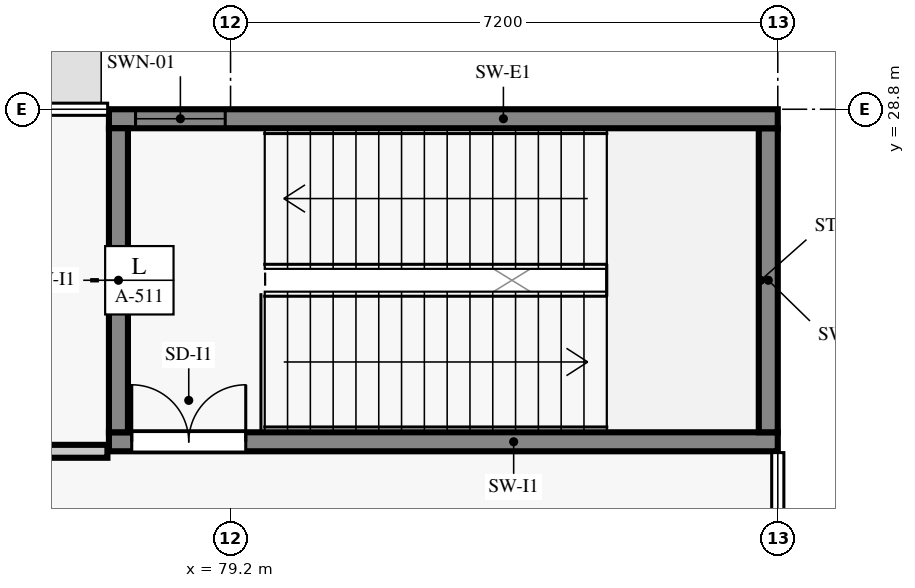
"""IFC4 building model, lengths in metres.
Left out: names, types, materials, properties, quantities, classifications, styles, units other than length and angle.
Written with IfcOpenShell. Run it as: python <this file> out.ifc"""

import sys

from ifc_helpers import new_model, si_unit, direction, frame, frame_2d, origin, place, context, subcontext, project, spatial, rectangle, extrude, element, fill, save


model = new_model("IFC4")
c1 = context("Model", 3, precision=1e-05, world=origin(), true_north=direction((0.0, 1.0)))
c2 = subcontext(c1, "Body", "Model", "MODEL_VIEW")
j1 = project(units=[si_unit("LENGTHUNIT", "METRE"), si_unit("PLANEANGLEUNIT", "RADIAN")], contexts=[c1])
p1 = place(None, origin())
s1 = spatial("IfcSite", under=j1, at=p1, CompositionType="ELEMENT")
p2 = place(p1, origin())
s2 = spatial("IfcBuilding", under=s1, at=p2, CompositionType="ELEMENT")
p3 = place(p2, frame((0.0, 0.0, 4.8)))
s3 = spatial("IfcBuildingStorey", under=s2, at=p3, CompositionType="ELEMENT", Elevation=4.8)
p4 = place(p3, frame((77.6, 24.425, 0.0), z_axis=(0.0, 0.0, 1.0), x_axis=(1.0, 0.0, 0.0)))
e1 = element("IfcWall", 1, at=p4, inside=s3, PredefinedType="SHEAR", context=c2, shape_type="SweptSolid", body=[
    extrude(rectangle(XDim=8.8, YDim=0.25, at=frame_2d((4.4, 0.0))), origin(), (0.0, 0.0, 1.0), 4.505),
])
p5 = place(p4, frame((0.3, 0.0, 0.0)))
e2 = element("IfcOpeningElement", 2, at=p5, cuts=e1, PredefinedType="OPENING", context=c2, shape_type="SweptSolid", body=[
    extrude(rectangle(XDim=1.5, YDim=2.15, at=frame_2d((0.75, 1.075))), frame((0.0, 0.135, 0.0), z_axis=(0.0, -1.0, 0.0), x_axis=(1.0, 0.0, 0.0)), (0.0, 0.0, 1.0), 0.27),
])
p6 = place(p3, frame((86.275, 24.55, 0.0), z_axis=(0.0, 0.0, 1.0), x_axis=(0.0, 1.0, 0.0)))
e3 = element("IfcWall", 3, at=p6, inside=s3, PredefinedType="SHEAR", context=c2, shape_type="SweptSolid", body=[
    extrude(rectangle(XDim=4.0, YDim=0.25, at=frame_2d((2.0, 0.0))), origin(), (0.0, 0.0, 1.0), 4.505),
])
p7 = place(p3, frame((86.4, 28.675, 0.0), z_axis=(0.0, 0.0, 1.0), x_axis=(-1.0, 0.0, 0.0)))
e4 = element("IfcWall", 4, at=p7, inside=s3, PredefinedType="SHEAR", context=c2, shape_type="SweptSolid", body=[
    extrude(rectangle(XDim=8.8, YDim=0.25, at=frame_2d((4.4, 0.0))), origin(), (0.0, 0.0, 1.0), 4.505),
])
p8 = place(p7, frame((7.27, 0.0, 0.92)))
e5 = element("IfcOpeningElement", 5, at=p8, cuts=e4, PredefinedType="OPENING", context=c2, shape_type="SweptSolid", body=[
    extrude(rectangle(XDim=1.18, YDim=1.48, at=frame_2d((0.59, 0.74))), frame((0.0, 0.135, 0.0), z_axis=(0.0, -1.0, 0.0), x_axis=(1.0, 0.0, 0.0)), (0.0, 0.0, 1.0), 0.27),
])
p9 = place(p3, frame((77.725, 28.55, 0.0), z_axis=(0.0, 0.0, 1.0), x_axis=(0.0, -1.0, 0.0)))
e6 = element("IfcWall", 6, at=p9, inside=s3, PredefinedType="SHEAR", context=c2, shape_type="SweptSolid", body=[
    extrude(rectangle(XDim=4.0, YDim=0.25, at=frame_2d((2.0, 0.0))), origin(), (0.0, 0.0, 1.0), 4.505),
])
p10 = place(p3, frame((68.82, 24.3, 0.0), z_axis=(0.0, 0.0, 1.0), x_axis=(1.0, 0.0, 0.0)))
e7 = element("IfcWall", 7, at=p10, inside=s3, PredefinedType="PARTITIONING", context=c2, shape_type="SweptSolid", body=[
    extrude(rectangle(XDim=8.76, YDim=0.17, at=frame_2d((4.38, 0.0))), origin(), (0.0, 0.0, 1.0), 3.905),
])
p11 = place(p10, frame((6.565, 0.0, 0.0)))
e8 = element("IfcOpeningElement", 8, at=p11, cuts=e7, PredefinedType="OPENING", context=c2, shape_type="SweptSolid", body=[
    extrude(rectangle(XDim=1.0, YDim=2.13, at=frame_2d((0.5, 1.065))), frame((0.0, 0.095, 0.0), z_axis=(0.0, -1.0, 0.0), x_axis=(1.0, 0.0, 0.0)), (0.0, 0.0, 1.0), 0.19),
])
p12 = place(p5, origin())
e9 = element("IfcDoor", 9, at=p12, inside=s3, OperationType="DOUBLE_DOOR_SINGLE_SWING", PredefinedType="DOOR", context=c2, shape_type="SweptSolid", body=[
    extrude(rectangle(XDim=1.5, YDim=2.15, at=frame_2d((0.75, 1.075))), frame((0.0, 0.025, 0.0), z_axis=(0.0, -1.0, 0.0), x_axis=(1.0, 0.0, 0.0)), (0.0, 0.0, 1.0), 0.05),
])
fill(e2, e9)
p13 = place(p8, origin())
e10 = element("IfcWindow", 10, at=p13, inside=s3, PartitioningType="SINGLE_PANEL", PredefinedType="WINDOW", context=c2, shape_type="SweptSolid", body=[
    extrude(rectangle(XDim=1.18, YDim=1.48, at=frame_2d((0.59, 0.74))), frame((0.0, 0.03, 0.0), z_axis=(0.0, -1.0, 0.0), x_axis=(1.0, 0.0, 0.0)), (0.0, 0.0, 1.0), 0.06),
])
fill(e5, e10)
save(model, sys.argv[1])
